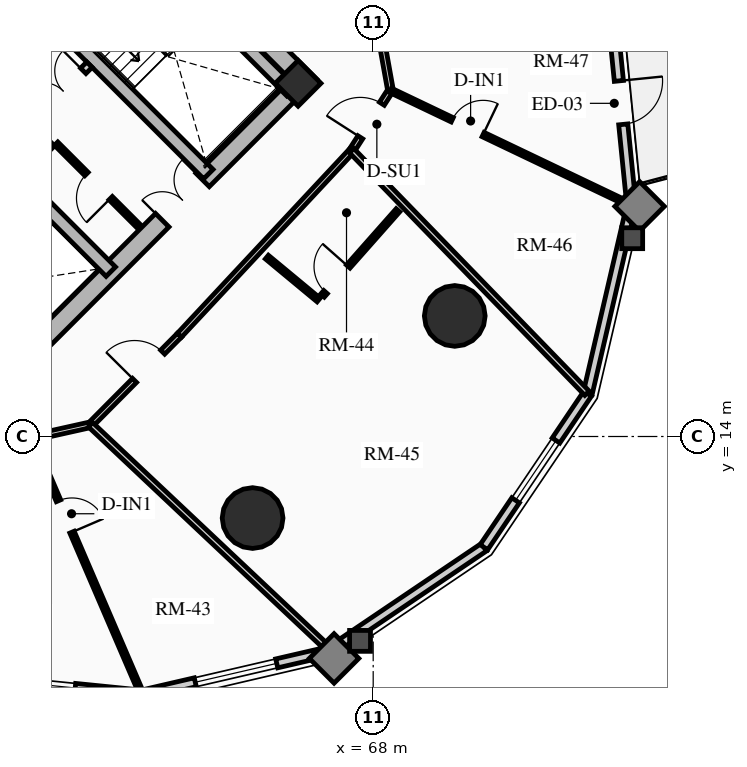
"""IFC4 building model, lengths in metres.
Left out: names, types, materials, properties, quantities, classifications, styles, units other than length and angle.
Written with IfcOpenShell. Run it as: python <this file> out.ifc"""

import sys

from ifc_helpers import new_model, si_unit, direction, frame, frame_2d, origin, origin_2d, place, context, subcontext, project, spatial, rectangle, circle, extrude, source, transform, mapped, element, fill, save


model = new_model("IFC4")
c1 = context("Model", 3, precision=1e-05, world=origin(), true_north=direction((0.0, 1.0)))
c2 = subcontext(c1, "Body", "Model", "MODEL_VIEW")
j1 = project(units=[si_unit("LENGTHUNIT", "METRE"), si_unit("PLANEANGLEUNIT", "RADIAN")], contexts=[c1])
p1 = place(None, origin())
s1 = spatial("IfcSite", under=j1, at=p1, CompositionType="ELEMENT")
p2 = place(p1, origin())
s2 = spatial("IfcBuilding", under=s1, at=p2, CompositionType="ELEMENT")
p3 = place(p2, frame((0.0, 0.0, 30.73)))
s3 = spatial("IfcBuildingStorey", under=s2, at=p3, CompositionType="ELEMENT", Elevation=30.73)
p4 = place(p3, frame((66.339, 23.227, 0.0), z_axis=(0.0, 0.0, 1.0), x_axis=(-0.707106781187, 0.707106781187, 0.0)))
e1 = element("IfcWall", 1, at=p4, inside=s3, PredefinedType="SHEAR", context=c2, shape_type="SweptSolid", body=[
    extrude(rectangle(XDim=14.3, YDim=0.5, at=frame_2d((7.15, 0.0))), origin(), (0.0, 0.0, 1.0), 2.91),
])
p5 = place(p3, frame((58.596, 15.838, 0.0), z_axis=(0.0, 0.0, 1.0), x_axis=(0.707106781187, 0.707106781187, 0.0)))
e2 = element("IfcWall", 2, at=p5, inside=s3, PredefinedType="SHEAR", context=c2, shape_type="SweptSolid", body=[
    extrude(rectangle(XDim=10.7, YDim=0.5, at=frame_2d((5.35, 0.0))), origin(), (0.0, 0.0, 1.0), 2.91),
])
m1 = source(origin(), c2, "Body", "SweptSolid", [
    extrude(rectangle(XDim=1.5, YDim=2.02, at=frame_2d((0.75, 1.01))), frame((0.0, 0.26, 0.0), z_axis=(0.0, -1.0, 0.0), x_axis=(1.0, 0.0, 0.0)), (0.0, 0.0, 1.0), 0.52),
])
p6 = place(p5, frame((5.45, 0.0, 0.0)))
e3 = element("IfcOpeningElement", 3, at=p6, cuts=e2, PredefinedType="OPENING", context=c2, shape_type="MappedRepresentation", body=[
    mapped(m1, transform((0.0, 0.0, 0.0), x_axis=(1.0, 0.0, 0.0), y_axis=(0.0, 1.0, 0.0), z_axis=(0.0, 0.0, 1.0), scale=1.0)),
])
p7 = place(p3, frame((61.096, 18.338, 0.0), z_axis=(0.0, 0.0, 1.0), x_axis=(-0.707106781187, 0.707106781187, 0.0)))
e4 = element("IfcWall", 4, at=p7, inside=s3, PredefinedType="SHEAR", context=c2, shape_type="SweptSolid", body=[
    extrude(rectangle(XDim=13.8, YDim=0.35, at=frame_2d((6.9, 0.0))), origin(), (0.0, 0.0, 1.0), 2.91),
])
m2 = source(origin(), c2, "Body", "SweptSolid", [
    extrude(rectangle(XDim=1.1, YDim=2.015, at=frame_2d((0.55, 1.007))), frame((0.0, 0.185, 0.0), z_axis=(0.0, -1.0, 0.0), x_axis=(1.0, 0.0, 0.0)), (0.0, 0.0, 1.0), 0.37),
])
p8 = place(p7, frame((4.9, 0.0, 0.0)))
e5 = element("IfcOpeningElement", 5, at=p8, cuts=e4, PredefinedType="OPENING", context=c2, shape_type="MappedRepresentation", body=[
    mapped(m2, transform((0.0, 0.0, 0.0), x_axis=(1.0, 0.0, 0.0), y_axis=(0.0, 1.0, 0.0), z_axis=(0.0, 0.0, 1.0), scale=1.0)),
])
m3 = source(origin(), c2, "Body", "SweptSolid", [
    extrude(rectangle(XDim=1.15, YDim=2.02, at=frame_2d((0.575, 1.01))), frame((0.0, 0.185, 0.0), z_axis=(0.0, -1.0, 0.0), x_axis=(1.0, 0.0, 0.0)), (0.0, 0.0, 1.0), 0.37),
])
p9 = place(p7, frame((7.32, 0.0, 0.0)))
e6 = element("IfcOpeningElement", 6, at=p9, cuts=e4, PredefinedType="OPENING", context=c2, shape_type="MappedRepresentation", body=[
    mapped(m3, transform((0.0, 0.0, 0.0), x_axis=(1.0, 0.0, 0.0), y_axis=(0.0, 1.0, 0.0), z_axis=(0.0, 0.0, 1.0), scale=1.0)),
])
p10 = place(p3, frame((63.662, 20.904, 0.0), z_axis=(0.0, 0.0, 1.0), x_axis=(-0.707106781187, 0.707106781187, 0.0)))
e7 = element("IfcWall", 7, at=p10, inside=s3, PredefinedType="SHEAR", context=c2, shape_type="SweptSolid", body=[
    extrude(rectangle(XDim=13.8, YDim=0.35, at=frame_2d((6.9, 0.0))), origin(), (0.0, 0.0, 1.0), 2.91),
])
p11 = place(p10, frame((10.025, 0.0, 0.0)))
e8 = element("IfcOpeningElement", 8, at=p11, cuts=e7, PredefinedType="OPENING", context=c2, shape_type="MappedRepresentation", body=[
    mapped(m2, transform((0.0, 0.0, 0.0), x_axis=(1.0, 0.0, 0.0), y_axis=(0.0, 1.0, 0.0), z_axis=(0.0, 0.0, 1.0), scale=1.0)),
])
p12 = place(p10, frame((12.025, 0.0, 0.0)))
e9 = element("IfcOpeningElement", 9, at=p12, cuts=e7, PredefinedType="OPENING", context=c2, shape_type="MappedRepresentation", body=[
    mapped(m2, transform((0.0, 0.0, 0.0), x_axis=(1.0, 0.0, 0.0), y_axis=(0.0, 1.0, 0.0), z_axis=(0.0, 0.0, 1.0), scale=1.0)),
])
p13 = place(p10, frame((5.33, 0.0, 0.0)))
e10 = element("IfcOpeningElement", 10, at=p13, cuts=e7, PredefinedType="OPENING", context=c2, shape_type="MappedRepresentation", body=[
    mapped(m3, transform((0.0, 0.0, 0.0), x_axis=(1.0, 0.0, 0.0), y_axis=(0.0, 1.0, 0.0), z_axis=(0.0, 0.0, 1.0), scale=1.0)),
])
p14 = place(p3, frame((65.847, 23.089, 0.0), z_axis=(0.0, 0.0, 1.0), x_axis=(-0.707106781187, 0.707106781187, 0.0)))
e11 = element("IfcWall", 11, at=p14, inside=s3, PredefinedType="SHEAR", context=c2, shape_type="SweptSolid", body=[
    extrude(rectangle(XDim=6.745, YDim=0.35, at=frame_2d((3.373, 0.0))), origin(), (0.0, 0.0, 1.0), 2.91),
])
p15 = place(p3, frame((66.024, 23.294, 0.0), z_axis=(0.0, 0.0, 1.0), x_axis=(0.707106781187, 0.707106781187, 0.0)))
e12 = element("IfcColumn", 12, at=p15, inside=s3, PredefinedType="COLUMN", context=c2, shape_type="SweptSolid", body=[
    extrude(rectangle(XDim=0.85, YDim=0.85, at=origin_2d()), origin(), (0.0, 0.0, 1.0), 2.91),
])
for number, where, z_axis, x_axis in (
    (13, (64.827, 11.854, 0.0), (0.0, 0.0, 1.0), (1.0, 0.0, 0.0)),
    (14, (70.146, 17.173, 0.0), (0.0, 0.0, 1.0), (1.0, 0.0, 0.0)),
):
    element("IfcColumn", number, at=place(p3, frame(where, z_axis=z_axis, x_axis=x_axis)), inside=s3, PredefinedType="USERDEFINED", context=c2, shape_type="SweptSolid", body=[
        extrude(circle(Radius=0.8, at=origin_2d()), origin(), (0.0, 0.0, 1.0), 2.91),
    ])
p16 = place(p3, frame((61.91, 7.206, 0.0), z_axis=(0.0, 0.0, 1.0), x_axis=(-0.994968263437, 0.100190592135, 0.0)))
e15 = element("IfcWall", 15, at=p16, inside=s3, PredefinedType="SOLIDWALL", context=c2, shape_type="SweptSolid", body=[
    extrude(rectangle(XDim=5.419, YDim=0.24, at=frame_2d((2.71, 0.0))), origin(), (0.0, 0.0, 1.0), 2.073),
])
m4 = source(origin(), c2, "Body", "SweptSolid", [
    extrude(rectangle(XDim=1.9, YDim=1.35, at=frame_2d((0.95, 0.675))), frame((0.0, 0.13, 0.0), z_axis=(0.0, -1.0, 0.0), x_axis=(1.0, 0.0, 0.0)), (0.0, 0.0, 1.0), 0.26),
])
p17 = place(p16, frame((1.76, 0.0, 0.65)))
e16 = element("IfcOpeningElement", 16, at=p17, cuts=e15, PredefinedType="OPENING", context=c2, shape_type="MappedRepresentation", body=[
    mapped(m4, transform((0.0, 0.0, 0.0), x_axis=(1.0, 0.0, 0.0), y_axis=(0.0, 1.0, 0.0), z_axis=(0.0, 0.0, 1.0), scale=1.0)),
])
p18 = place(p3, frame((66.871, 8.356, 0.0), z_axis=(0.0, 0.0, 1.0), x_axis=(-0.974167686491, -0.22582585901, 0.0)))
e17 = element("IfcWall", 17, at=p18, inside=s3, PredefinedType="SOLIDWALL", context=c2, shape_type="SweptSolid", body=[
    extrude(rectangle(XDim=5.092, YDim=0.24, at=frame_2d((2.546, 0.0))), origin(), (0.0, 0.0, 1.0), 2.073),
])
m5 = source(origin(), c2, "Body", "SweptSolid", [
    extrude(rectangle(XDim=2.2, YDim=1.35, at=frame_2d((1.1, 0.675))), frame((0.0, 0.13, 0.0), z_axis=(0.0, -1.0, 0.0), x_axis=(1.0, 0.0, 0.0)), (0.0, 0.0, 1.0), 0.26),
])
p19 = place(p18, frame((1.446, 0.0, 0.65)))
e18 = element("IfcOpeningElement", 18, at=p19, cuts=e17, PredefinedType="OPENING", context=c2, shape_type="MappedRepresentation", body=[
    mapped(m5, transform((0.0, 0.0, 0.0), x_axis=(1.0, 0.0, 0.0), y_axis=(0.0, 1.0, 0.0), z_axis=(0.0, 0.0, 1.0), scale=1.0)),
])
p20 = place(p3, frame((70.914, 11.086, 0.0), z_axis=(0.0, 0.0, 1.0), x_axis=(-0.828748297084, -0.559621532896, 0.0)))
e19 = element("IfcWall", 19, at=p20, inside=s3, PredefinedType="SOLIDWALL", context=c2, shape_type="SweptSolid", body=[
    extrude(rectangle(XDim=4.879, YDim=0.24, at=frame_2d((2.439, 0.0))), origin(), (0.0, 0.0, 1.0), 2.073),
])
p21 = place(p3, frame((73.644, 15.129, 0.0), z_axis=(0.0, 0.0, 1.0), x_axis=(-0.559621532896, -0.828748297084, 0.0)))
e20 = element("IfcWall", 20, at=p21, inside=s3, PredefinedType="SOLIDWALL", context=c2, shape_type="SweptSolid", body=[
    extrude(rectangle(XDim=4.879, YDim=0.24, at=frame_2d((2.439, 0.0))), origin(), (0.0, 0.0, 1.0), 2.073),
])
p22 = place(p21, frame((1.489, 0.0, 0.65)))
e21 = element("IfcOpeningElement", 21, at=p22, cuts=e20, PredefinedType="OPENING", context=c2, shape_type="MappedRepresentation", body=[
    mapped(m4, transform((0.0, 0.0, 0.0), x_axis=(1.0, 0.0, 0.0), y_axis=(0.0, 1.0, 0.0), z_axis=(0.0, 0.0, 1.0), scale=1.0)),
])
p23 = place(p3, frame((74.794, 20.09, 0.0), z_axis=(0.0, 0.0, 1.0), x_axis=(-0.22582585901, -0.974167686491, 0.0)))
e22 = element("IfcWall", 22, at=p23, inside=s3, PredefinedType="SOLIDWALL", context=c2, shape_type="SweptSolid", body=[
    extrude(rectangle(XDim=5.092, YDim=0.24, at=frame_2d((2.546, 0.0))), origin(), (0.0, 0.0, 1.0), 2.073),
])
p24 = place(p3, frame((74.251, 25.482, 0.0), z_axis=(0.0, 0.0, 1.0), x_axis=(0.100190592135, -0.994968263437, 0.0)))
e23 = element("IfcWall", 23, at=p24, inside=s3, PredefinedType="SOLIDWALL", context=c2, shape_type="SweptSolid", body=[
    extrude(rectangle(XDim=5.419, YDim=0.24, at=frame_2d((2.71, 0.0))), origin(), (0.0, 0.0, 1.0), 2.073),
])
m6 = source(origin(), c2, "Body", "SweptSolid", [
    extrude(rectangle(XDim=1.15, YDim=2.005, at=frame_2d((0.575, 1.002))), frame((0.0, 0.13, 0.0), z_axis=(0.0, -1.0, 0.0), x_axis=(1.0, 0.0, 0.0)), (0.0, 0.0, 1.0), 0.26),
])
p25 = place(p24, frame((2.135, 0.0, 0.0)))
e24 = element("IfcOpeningElement", 24, at=p25, cuts=e23, PredefinedType="OPENING", context=c2, shape_type="MappedRepresentation", body=[
    mapped(m6, transform((0.0, 0.0, 0.0), x_axis=(1.0, 0.0, 0.0), y_axis=(0.0, 1.0, 0.0), z_axis=(0.0, 0.0, 1.0), scale=1.0)),
])
p26 = place(p3, frame((58.214, 21.467, 0.0), z_axis=(0.0, 0.0, 1.0), x_axis=(0.707106781187, 0.707106781187, 0.0)))
e25 = element("IfcWall", 25, at=p26, inside=s3, PredefinedType="PARTITIONING", context=c2, shape_type="SweptSolid", body=[
    extrude(rectangle(XDim=3.28, YDim=0.2, at=frame_2d((1.64, 0.0))), origin(), (0.0, 0.0, 1.0), 2.635),
])
m7 = source(origin(), c2, "Body", "SweptSolid", [
    extrude(rectangle(XDim=1.5, YDim=2.02, at=frame_2d((0.75, 1.01))), frame((0.0, 0.11, 0.0), z_axis=(0.0, -1.0, 0.0), x_axis=(1.0, 0.0, 0.0)), (0.0, 0.0, 1.0), 0.22),
])
p27 = place(p26, frame((1.55, 0.0, 0.0)))
e26 = element("IfcOpeningElement", 26, at=p27, cuts=e25, PredefinedType="OPENING", context=c2, shape_type="MappedRepresentation", body=[
    mapped(m7, transform((0.0, 0.0, 0.0), x_axis=(1.0, 0.0, 0.0), y_axis=(0.0, 1.0, 0.0), z_axis=(0.0, 0.0, 1.0), scale=1.0)),
])
p28 = place(p3, frame((61.835, 19.529, 0.0), z_axis=(0.0, 0.0, 1.0), x_axis=(-0.707146413884, 0.707067146267, 0.0)))
e27 = element("IfcWall", 27, at=p28, inside=s3, PredefinedType="PARTITIONING", context=c2, shape_type="SweptSolid", body=[
    extrude(rectangle(XDim=3.08, YDim=0.125, at=frame_2d((1.54, 0.0))), origin(), (0.0, 0.0, 1.0), 2.635),
])
m8 = source(origin(), c2, "Body", "SweptSolid", [
    extrude(rectangle(XDim=0.9, YDim=2.005, at=frame_2d((0.45, 1.002))), frame((0.0, 0.073, 0.0), z_axis=(0.0, -1.0, 0.0), x_axis=(1.0, 0.0, 0.0)), (0.0, 0.0, 1.0), 0.145),
])
p29 = place(p28, frame((1.05, 0.0, 0.0)))
e28 = element("IfcOpeningElement", 28, at=p29, cuts=e27, PredefinedType="OPENING", context=c2, shape_type="MappedRepresentation", body=[
    mapped(m8, transform((0.0, 0.0, 0.0), x_axis=(1.0, 0.0, 0.0), y_axis=(0.0, 1.0, 0.0), z_axis=(0.0, 0.0, 1.0), scale=1.0)),
])
p30 = place(p3, frame((58.794, 20.915, 0.0), z_axis=(0.0, 0.0, 1.0), x_axis=(0.707106781187, 0.707106781187, 0.0)))
e29 = element("IfcWall", 29, at=p30, inside=s3, PredefinedType="PARTITIONING", context=c2, shape_type="SweptSolid", body=[
    extrude(rectangle(XDim=1.1, YDim=0.125, at=frame_2d((0.55, 0.0))), origin(), (0.0, 0.0, 1.0), 2.635),
])
p31 = place(p3, frame((59.008, 13.963, 0.0), z_axis=(0.0, 0.0, 1.0), x_axis=(0.976020856791, 0.21767702476, 0.0)))
e30 = element("IfcWall", 30, at=p31, inside=s3, PredefinedType="PARTITIONING", context=c2, shape_type="SweptSolid", body=[
    extrude(rectangle(XDim=1.593, YDim=0.15, at=frame_2d((0.796, 0.0))), origin(), (0.0, 0.0, 1.0), 2.205),
])
p32 = place(p3, frame((60.562, 14.31, 0.0), z_axis=(0.0, 0.0, 1.0), x_axis=(0.704566236161, 0.709638230975, 0.0)))
e31 = element("IfcWall", 31, at=p32, inside=s3, PredefinedType="PARTITIONING", context=c2, shape_type="SweptSolid", body=[
    extrude(rectangle(XDim=3.321, YDim=0.15, at=frame_2d((1.661, 0.0))), origin(), (0.0, 0.0, 1.0), 2.159),
])
m9 = source(origin(), c2, "Body", "SweptSolid", [
    extrude(rectangle(XDim=1.05, YDim=2.015, at=frame_2d((0.525, 1.007))), frame((0.0, 0.085, 0.0), z_axis=(0.0, -1.0, 0.0), x_axis=(1.0, 0.0, 0.0)), (0.0, 0.0, 1.0), 0.17),
])
p33 = place(p32, frame((1.643, 0.0, 0.0)))
e32 = element("IfcOpeningElement", 32, at=p33, cuts=e31, PredefinedType="OPENING", context=c2, shape_type="MappedRepresentation", body=[
    mapped(m9, transform((0.0, 0.0, 0.0), x_axis=(1.0, 0.0, 0.0), y_axis=(0.0, 1.0, 0.0), z_axis=(0.0, 0.0, 1.0), scale=1.0)),
])
p34 = place(p3, frame((62.903, 16.667, 0.0), z_axis=(0.0, 0.0, 1.0), x_axis=(0.682371947497, 0.731005147225, 0.0)))
e33 = element("IfcWall", 33, at=p34, inside=s3, PredefinedType="PARTITIONING", context=c2, shape_type="SweptSolid", body=[
    extrude(rectangle(XDim=6.642, YDim=0.15, at=frame_2d((3.321, 0.0))), origin(), (0.0, 0.0, 1.0), 2.159),
])
p35 = place(p3, frame((67.435, 21.521, 0.0), z_axis=(0.0, 0.0, 1.0), x_axis=(0.540777197838, 0.841165870859, 0.0)))
e34 = element("IfcWall", 34, at=p35, inside=s3, PredefinedType="PARTITIONING", context=c2, shape_type="SweptSolid", body=[
    extrude(rectangle(XDim=1.888, YDim=0.15, at=frame_2d((0.944, 0.0))), origin(), (0.0, 0.0, 1.0), 2.205),
])
p36 = place(p35, frame((0.419, 0.0, 0.0)))
e35 = element("IfcOpeningElement", 35, at=p36, cuts=e34, PredefinedType="OPENING", context=c2, shape_type="MappedRepresentation", body=[
    mapped(m9, transform((0.0, 0.0, 0.0), x_axis=(1.0, 0.0, 0.0), y_axis=(0.0, 1.0, 0.0), z_axis=(0.0, 0.0, 1.0), scale=1.0)),
])
p37 = place(p3, frame((68.456, 23.11, 0.0), z_axis=(0.0, 0.0, 1.0), x_axis=(-0.1772522795, 0.984165448191, 0.0)))
e36 = element("IfcWall", 36, at=p37, inside=s3, PredefinedType="PARTITIONING", context=c2, shape_type="SweptSolid", body=[
    extrude(rectangle(XDim=1.382, YDim=0.15, at=frame_2d((0.691, 0.0))), origin(), (0.0, 0.0, 1.0), 2.159),
])
p38 = place(p3, frame((60.562, 14.31, 0.0), z_axis=(0.0, 0.0, 1.0), x_axis=(0.727781661561, -0.685808904211, 0.0)))
e37 = element("IfcWall", 37, at=p38, inside=s3, PredefinedType="PARTITIONING", context=c2, shape_type="SweptSolid", body=[
    extrude(rectangle(XDim=8.655, YDim=0.16, at=frame_2d((4.328, 0.0))), origin(), (0.0, 0.0, 1.0), 2.073),
])
p39 = place(p3, frame((67.435, 21.521, 0.0), z_axis=(0.0, 0.0, 1.0), x_axis=(0.6962628802, -0.717786877601, 0.0)))
e38 = element("IfcWall", 38, at=p39, inside=s3, PredefinedType="PARTITIONING", context=c2, shape_type="SweptSolid", body=[
    extrude(rectangle(XDim=8.893, YDim=0.16, at=frame_2d((4.446, 0.0))), origin(), (0.0, 0.0, 1.0), 2.073),
])
p40 = place(p3, frame((59.008, 13.963, 0.0), z_axis=(0.0, 0.0, 1.0), x_axis=(0.395256697593, -0.918570706592, 0.0)))
e39 = element("IfcWall", 39, at=p40, inside=s3, PredefinedType="PARTITIONING", context=c2, shape_type="SweptSolid", body=[
    extrude(rectangle(XDim=7.334, YDim=0.125, at=frame_2d((3.667, 0.0))), origin(), (0.0, 0.0, 1.0), 2.073),
])
p41 = place(p40, frame((1.8, 0.0, 0.0)))
e40 = element("IfcOpeningElement", 40, at=p41, cuts=e39, PredefinedType="OPENING", context=c2, shape_type="MappedRepresentation", body=[
    mapped(m8, transform((0.0, 0.0, 0.0), x_axis=(1.0, 0.0, 0.0), y_axis=(0.0, 1.0, 0.0), z_axis=(0.0, 0.0, 1.0), scale=1.0)),
])
p42 = place(p3, frame((65.202, 18.721, 0.0), z_axis=(0.0, 0.0, 1.0), x_axis=(0.769814202386, -0.638268042287, 0.0)))
e41 = element("IfcWall", 41, at=p42, inside=s3, PredefinedType="PARTITIONING", context=c2, shape_type="SweptSolid", body=[
    extrude(rectangle(XDim=1.769, YDim=0.125, at=frame_2d((0.884, 0.0))), origin(), (0.0, 0.0, 1.0), 2.635),
])
p43 = place(p3, frame((66.667, 17.709, 0.0), z_axis=(0.0, 0.0, 1.0), x_axis=(0.662510581678, 0.749052554341, 0.0)))
e42 = element("IfcWall", 42, at=p43, inside=s3, PredefinedType="PARTITIONING", context=c2, shape_type="SweptSolid", body=[
    extrude(rectangle(XDim=2.996, YDim=0.125, at=frame_2d((1.498, 0.0))), origin(), (0.0, 0.0, 1.0), 2.159),
])
p44 = place(p43, frame((0.12, 0.0, 0.0)))
e43 = element("IfcOpeningElement", 43, at=p44, cuts=e42, PredefinedType="OPENING", context=c2, shape_type="MappedRepresentation", body=[
    mapped(m8, transform((0.0, 0.0, 0.0), x_axis=(1.0, 0.0, 0.0), y_axis=(0.0, 1.0, 0.0), z_axis=(0.0, 0.0, 1.0), scale=1.0)),
])
p45 = place(p3, frame((68.456, 23.11, 0.0), z_axis=(0.0, 0.0, 1.0), x_axis=(0.902430819297, -0.430834790125, 0.0)))
e44 = element("IfcWall", 44, at=p45, inside=s3, PredefinedType="PARTITIONING", context=c2, shape_type="SweptSolid", body=[
    extrude(rectangle(XDim=7.002, YDim=0.125, at=frame_2d((3.501, 0.0))), origin(), (0.0, 0.0, 1.0), 2.073),
])
p46 = place(p45, frame((1.8, 0.0, 0.0)))
e45 = element("IfcOpeningElement", 45, at=p46, cuts=e44, PredefinedType="OPENING", context=c2, shape_type="MappedRepresentation", body=[
    mapped(m8, transform((0.0, 0.0, 0.0), x_axis=(1.0, 0.0, 0.0), y_axis=(0.0, 1.0, 0.0), z_axis=(0.0, 0.0, 1.0), scale=1.0)),
])
m10 = source(origin(), c2, "Body", "SweptSolid", [
    extrude(rectangle(XDim=1.9, YDim=1.35, at=frame_2d((0.95, 0.675))), frame((0.0, 0.03, 0.0), z_axis=(0.0, -1.0, 0.0), x_axis=(1.0, 0.0, 0.0)), (0.0, 0.0, 1.0), 0.06),
])
p47 = place(p17, origin())
e46 = element("IfcWindow", 46, at=p47, inside=s3, PartitioningType="DOUBLE_PANEL_VERTICAL", PredefinedType="WINDOW", context=c2, shape_type="MappedRepresentation", body=[
    mapped(m10, transform((0.0, 0.0, 0.0), x_axis=(1.0, 0.0, 0.0), y_axis=(0.0, 1.0, 0.0), z_axis=(0.0, 0.0, 1.0), scale=1.0)),
])
fill(e16, e46)
m11 = source(origin(), c2, "Body", "SweptSolid", [
    extrude(rectangle(XDim=2.2, YDim=1.35, at=frame_2d((1.1, 0.675))), frame((0.0, 0.03, 0.0), z_axis=(0.0, -1.0, 0.0), x_axis=(1.0, 0.0, 0.0)), (0.0, 0.0, 1.0), 0.06),
])
p48 = place(p19, origin())
e47 = element("IfcWindow", 47, at=p48, inside=s3, PartitioningType="DOUBLE_PANEL_VERTICAL", PredefinedType="WINDOW", context=c2, shape_type="MappedRepresentation", body=[
    mapped(m11, transform((0.0, 0.0, 0.0), x_axis=(1.0, 0.0, 0.0), y_axis=(0.0, 1.0, 0.0), z_axis=(0.0, 0.0, 1.0), scale=1.0)),
])
fill(e18, e47)
p49 = place(p22, origin())
e48 = element("IfcWindow", 48, at=p49, inside=s3, PartitioningType="DOUBLE_PANEL_VERTICAL", PredefinedType="WINDOW", context=c2, shape_type="MappedRepresentation", body=[
    mapped(m10, transform((0.0, 0.0, 0.0), x_axis=(1.0, 0.0, 0.0), y_axis=(0.0, 1.0, 0.0), z_axis=(0.0, 0.0, 1.0), scale=1.0)),
])
fill(e21, e48)
m12 = source(origin(), c2, "Body", "SweptSolid", [
    extrude(rectangle(XDim=1.15, YDim=2.005, at=frame_2d((0.575, 1.002))), frame((0.0, 0.025, 0.0), z_axis=(0.0, -1.0, 0.0), x_axis=(1.0, 0.0, 0.0)), (0.0, 0.0, 1.0), 0.05),
])
p50 = place(p25, origin())
e49 = element("IfcDoor", 49, at=p50, inside=s3, OperationType="SINGLE_SWING_LEFT", PredefinedType="DOOR", context=c2, shape_type="MappedRepresentation", body=[
    mapped(m12, transform((0.0, 0.0, 0.0), x_axis=(1.0, 0.0, 0.0), y_axis=(0.0, 1.0, 0.0), z_axis=(0.0, 0.0, 1.0), scale=1.0)),
])
fill(e24, e49)
m13 = source(origin(), c2, "Body", "SweptSolid", [
    extrude(rectangle(XDim=1.5, YDim=2.02, at=frame_2d((0.75, 1.01))), frame((0.0, 0.025, 0.0), z_axis=(0.0, -1.0, 0.0), x_axis=(1.0, 0.0, 0.0)), (0.0, 0.0, 1.0), 0.05),
])
p51 = place(p6, origin())
e50 = element("IfcDoor", 50, at=p51, inside=s3, OperationType="DOUBLE_DOOR_SINGLE_SWING", PredefinedType="DOOR", context=c2, shape_type="MappedRepresentation", body=[
    mapped(m13, transform((0.0, 0.0, 0.0), x_axis=(1.0, 0.0, 0.0), y_axis=(0.0, 1.0, 0.0), z_axis=(0.0, 0.0, 1.0), scale=1.0)),
])
fill(e3, e50)
p52 = place(p27, origin())
e51 = element("IfcDoor", 51, at=p52, inside=s3, OperationType="DOUBLE_DOOR_SINGLE_SWING", PredefinedType="DOOR", context=c2, shape_type="MappedRepresentation", body=[
    mapped(m13, transform((0.0, 0.0, 0.0), x_axis=(1.0, 0.0, 0.0), y_axis=(0.0, 1.0, 0.0), z_axis=(0.0, 0.0, 1.0), scale=1.0)),
])
fill(e26, e51)
m14 = source(origin(), c2, "Body", "SweptSolid", [
    extrude(rectangle(XDim=0.9, YDim=2.005, at=frame_2d((0.45, 1.002))), frame((0.0, 0.025, 0.0), z_axis=(0.0, -1.0, 0.0), x_axis=(1.0, 0.0, 0.0)), (0.0, 0.0, 1.0), 0.05),
])
p53 = place(p29, origin())
e52 = element("IfcDoor", 52, at=p53, inside=s3, OperationType="SINGLE_SWING_LEFT", PredefinedType="DOOR", context=c2, shape_type="MappedRepresentation", body=[
    mapped(m14, transform((0.0, 0.0, 0.0), x_axis=(1.0, 0.0, 0.0), y_axis=(0.0, 1.0, 0.0), z_axis=(0.0, 0.0, 1.0), scale=1.0)),
])
fill(e28, e52)
p54 = place(p41, origin())
e53 = element("IfcDoor", 53, at=p54, inside=s3, OperationType="SINGLE_SWING_RIGHT", PredefinedType="DOOR", context=c2, shape_type="MappedRepresentation", body=[
    mapped(m14, transform((0.0, 0.0, 0.0), x_axis=(1.0, 0.0, 0.0), y_axis=(0.0, 1.0, 0.0), z_axis=(0.0, 0.0, 1.0), scale=1.0)),
])
fill(e40, e53)
m15 = source(origin(), c2, "Body", "SweptSolid", [
    extrude(rectangle(XDim=1.05, YDim=2.015, at=frame_2d((0.525, 1.007))), frame((0.0, 0.025, 0.0), z_axis=(0.0, -1.0, 0.0), x_axis=(1.0, 0.0, 0.0)), (0.0, 0.0, 1.0), 0.05),
])
p55 = place(p33, origin())
e54 = element("IfcDoor", 54, at=p55, inside=s3, OperationType="SINGLE_SWING_LEFT", PredefinedType="DOOR", context=c2, shape_type="MappedRepresentation", body=[
    mapped(m15, transform((0.0, 0.0, 0.0), x_axis=(1.0, 0.0, 0.0), y_axis=(0.0, 1.0, 0.0), z_axis=(0.0, 0.0, 1.0), scale=1.0)),
])
fill(e32, e54)
p56 = place(p44, origin())
e55 = element("IfcDoor", 55, at=p56, inside=s3, OperationType="SINGLE_SWING_RIGHT", PredefinedType="DOOR", context=c2, shape_type="MappedRepresentation", body=[
    mapped(m14, transform((0.0, 0.0, 0.0), x_axis=(1.0, 0.0, 0.0), y_axis=(0.0, 1.0, 0.0), z_axis=(0.0, 0.0, 1.0), scale=1.0)),
])
fill(e43, e55)
p57 = place(p36, origin())
e56 = element("IfcDoor", 56, at=p57, inside=s3, OperationType="SINGLE_SWING_LEFT", PredefinedType="DOOR", context=c2, shape_type="MappedRepresentation", body=[
    mapped(m15, transform((0.0, 0.0, 0.0), x_axis=(1.0, 0.0, 0.0), y_axis=(0.0, 1.0, 0.0), z_axis=(0.0, 0.0, 1.0), scale=1.0)),
])
fill(e35, e56)
p58 = place(p46, origin())
e57 = element("IfcDoor", 57, at=p58, inside=s3, OperationType="SINGLE_SWING_RIGHT", PredefinedType="DOOR", context=c2, shape_type="MappedRepresentation", body=[
    mapped(m14, transform((0.0, 0.0, 0.0), x_axis=(1.0, 0.0, 0.0), y_axis=(0.0, 1.0, 0.0), z_axis=(0.0, 0.0, 1.0), scale=1.0)),
])
fill(e45, e57)
save(model, sys.argv[1])
